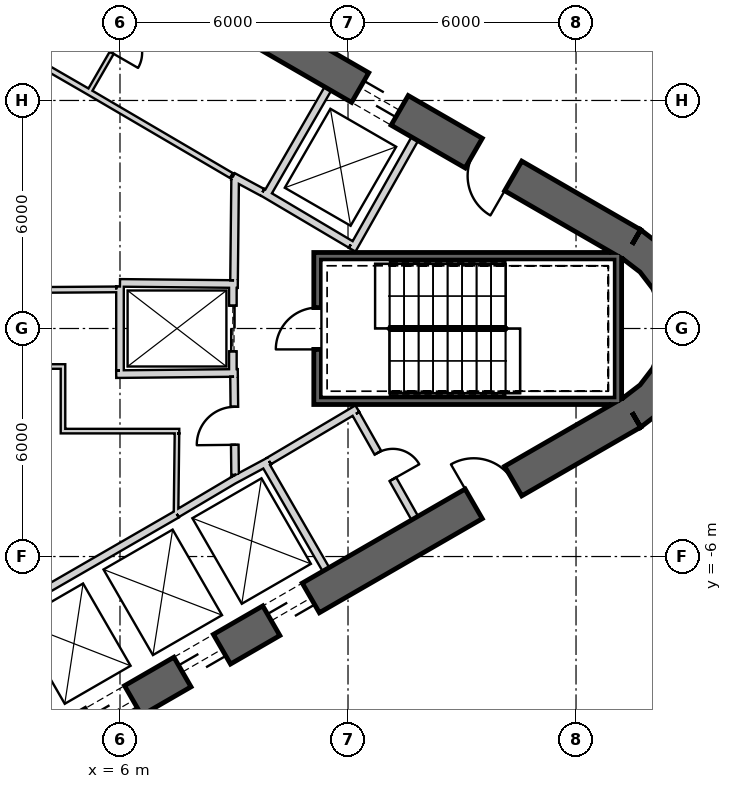
"""IFC4 building model, lengths in metres.
Left out: names, types, materials, properties, quantities, classifications, styles, units other than length and angle.
Written with IfcOpenShell. Run it as: python <this file> out.ifc"""

import sys

from ifc_helpers import new_model, si_unit, direction, frame, frame_2d, origin, place, context, subcontext, project, spatial, polyline, rectangle, outline, extrude, element, fill, save


model = new_model("IFC4")
c1 = context("Model", 3, precision=1e-05, world=origin(), true_north=direction((0.0, 1.0)))
c2 = subcontext(c1, "Body", "Model", "MODEL_VIEW")
j1 = project(units=[si_unit("LENGTHUNIT", "METRE"), si_unit("PLANEANGLEUNIT", "RADIAN")], contexts=[c1])
p1 = place(None, origin())
s1 = spatial("IfcSite", under=j1, at=p1, CompositionType="ELEMENT")
p2 = place(p1, origin())
s2 = spatial("IfcBuilding", under=s1, at=p2, CompositionType="ELEMENT")
p3 = place(p2, frame((0.0, 0.0, 277.2)))
s3 = spatial("IfcBuildingStorey", under=s2, at=p3, CompositionType="ELEMENT", Elevation=277.2)
p4 = place(p3, frame((19.475, 2.208, 0.0), z_axis=(0.0, 0.0, 1.0), x_axis=(-0.866028369851, 0.499994862586, 0.0)))
e1 = element("IfcWall", 1, at=p4, inside=s3, PredefinedType="SHEAR", context=c2, shape_type="SweptSolid", body=[
    extrude(rectangle(XDim=31.523, YDim=0.9, at=frame_2d((15.762, 0.0))), origin(), (0.0, 0.0, 1.0), 6.5),
])
p5 = place(p4, frame((7.062, 0.0, 0.0)))
e2 = element("IfcOpeningElement", 2, at=p5, cuts=e1, PredefinedType="OPENING", context=c2, shape_type="SweptSolid", body=[
    extrude(rectangle(XDim=1.2, YDim=2.4, at=frame_2d((0.6, 1.2))), frame((0.0, 0.46, 0.0), z_axis=(0.0, -1.0, 0.0), x_axis=(1.0, 0.0, 0.0)), (0.0, 0.0, 1.0), 0.92),
])
p6 = place(p4, frame((3.612, 0.0, 0.0)))
e3 = element("IfcOpeningElement", 3, at=p6, cuts=e1, PredefinedType="OPENING", context=c2, shape_type="SweptSolid", body=[
    extrude(rectangle(XDim=1.2, YDim=2.4, at=frame_2d((0.6, 1.2))), frame((0.0, 0.46, 0.0), z_axis=(0.0, -1.0, 0.0), x_axis=(1.0, 0.0, 0.0)), (0.0, 0.0, 1.0), 0.92),
])
p7 = place(p4, frame((26.712, 0.0, 0.0)))
e4 = element("IfcOpeningElement", 4, at=p7, cuts=e1, PredefinedType="OPENING", context=c2, shape_type="SweptSolid", body=[
    extrude(rectangle(XDim=1.2, YDim=2.4, at=frame_2d((0.6, 1.2))), frame((0.0, 0.46, 0.0), z_axis=(0.0, -1.0, 0.0), x_axis=(1.0, 0.0, 0.0)), (0.0, 0.0, 1.0), 0.92),
])
p8 = place(p3, frame((-7.825, -17.97, 0.0), z_axis=(0.0, 0.0, 1.0), x_axis=(0.866028369851, 0.499994862586, 0.0)))
e5 = element("IfcWall", 5, at=p8, inside=s3, PredefinedType="SHEAR", context=c2, shape_type="SweptSolid", body=[
    extrude(rectangle(XDim=31.523, YDim=0.9, at=frame_2d((15.762, 0.0))), origin(), (0.0, 0.0, 1.0), 6.5),
])
p9 = place(p8, frame((7.062, 0.0, 0.0)))
e6 = element("IfcOpeningElement", 6, at=p9, cuts=e5, PredefinedType="OPENING", context=c2, shape_type="SweptSolid", body=[
    extrude(rectangle(XDim=1.2, YDim=2.4, at=frame_2d((0.6, 1.2))), frame((0.0, 0.46, 0.0), z_axis=(0.0, -1.0, 0.0), x_axis=(1.0, 0.0, 0.0)), (0.0, 0.0, 1.0), 0.92),
])
p10 = place(p8, frame((9.762, 0.0, 0.0)))
e7 = element("IfcOpeningElement", 7, at=p10, cuts=e5, PredefinedType="OPENING", context=c2, shape_type="SweptSolid", body=[
    extrude(rectangle(XDim=1.2, YDim=2.4, at=frame_2d((0.6, 1.2))), frame((0.0, 0.46, 0.0), z_axis=(0.0, -1.0, 0.0), x_axis=(1.0, 0.0, 0.0)), (0.0, 0.0, 1.0), 0.92),
])
p11 = place(p8, frame((12.462, 0.0, 0.0)))
e8 = element("IfcOpeningElement", 8, at=p11, cuts=e5, PredefinedType="OPENING", context=c2, shape_type="SweptSolid", body=[
    extrude(rectangle(XDim=1.2, YDim=2.4, at=frame_2d((0.6, 1.2))), frame((0.0, 0.46, 0.0), z_axis=(0.0, -1.0, 0.0), x_axis=(1.0, 0.0, 0.0)), (0.0, 0.0, 1.0), 0.92),
])
p12 = place(p8, frame((15.162, 0.0, 0.0)))
e9 = element("IfcOpeningElement", 9, at=p12, cuts=e5, PredefinedType="OPENING", context=c2, shape_type="SweptSolid", body=[
    extrude(rectangle(XDim=1.2, YDim=2.4, at=frame_2d((0.6, 1.2))), frame((0.0, 0.46, 0.0), z_axis=(0.0, -1.0, 0.0), x_axis=(1.0, 0.0, 0.0)), (0.0, 0.0, 1.0), 0.92),
])
p13 = place(p8, frame((17.862, 0.0, 0.0)))
e10 = element("IfcOpeningElement", 10, at=p13, cuts=e5, PredefinedType="OPENING", context=c2, shape_type="SweptSolid", body=[
    extrude(rectangle(XDim=1.2, YDim=2.4, at=frame_2d((0.6, 1.2))), frame((0.0, 0.46, 0.0), z_axis=(0.0, -1.0, 0.0), x_axis=(1.0, 0.0, 0.0)), (0.0, 0.0, 1.0), 0.92),
])
p14 = place(p8, frame((20.562, 0.0, 0.0)))
e11 = element("IfcOpeningElement", 11, at=p14, cuts=e5, PredefinedType="OPENING", context=c2, shape_type="SweptSolid", body=[
    extrude(rectangle(XDim=1.2, YDim=2.4, at=frame_2d((0.6, 1.2))), frame((0.0, 0.46, 0.0), z_axis=(0.0, -1.0, 0.0), x_axis=(1.0, 0.0, 0.0)), (0.0, 0.0, 1.0), 0.92),
])
p15 = place(p8, frame((26.712, 0.0, 0.0)))
e12 = element("IfcOpeningElement", 12, at=p15, cuts=e5, PredefinedType="OPENING", context=c2, shape_type="SweptSolid", body=[
    extrude(rectangle(XDim=1.2, YDim=2.4, at=frame_2d((0.6, 1.2))), frame((0.0, 0.46, 0.0), z_axis=(0.0, -1.0, 0.0), x_axis=(1.0, 0.0, 0.0)), (0.0, 0.0, 1.0), 0.92),
])
p16 = place(p8, frame((3.612, 0.0, 0.0)))
e13 = element("IfcOpeningElement", 13, at=p16, cuts=e5, PredefinedType="OPENING", context=c2, shape_type="SweptSolid", body=[
    extrude(rectangle(XDim=1.2, YDim=2.4, at=frame_2d((0.6, 1.2))), frame((0.0, 0.46, 0.0), z_axis=(0.0, -1.0, 0.0), x_axis=(1.0, 0.0, 0.0)), (0.0, 0.0, 1.0), 0.92),
])
p17 = place(p3, origin())
e14 = element("IfcWall", 14, at=p17, inside=s3, PredefinedType="SHEAR", context=c2, shape_type="SweptSolid", body=[
    extrude(outline(polyline([(19.7, -2.598), (20.321, -2.121), (20.798, -1.5), (21.098, -0.777), (21.2, 0.0), (21.098, 0.777), (20.798, 1.5), (20.321, 2.121), (19.7, 2.598), (19.25, 1.819), (19.685, 1.485), (20.019, 1.05), (20.229, 0.543), (20.3, 0.0), (20.229, -0.543), (20.019, -1.05), (19.685, -1.485), (19.25, -1.819), (19.7, -2.598)])), origin(), (0.0, 0.0, 1.0), 6.5),
])
p18 = place(p3, frame((9.847, 3.495, 0.0), z_axis=(0.0, 0.0, 1.0), x_axis=(0.499984717929, 0.866034226713, 0.0)))
e15 = element("IfcWall", 15, at=p18, inside=s3, PredefinedType="PLUMBINGWALL", context=c2, shape_type="SweptSolid", body=[
    extrude(rectangle(XDim=3.25, YDim=0.2, at=frame_2d((1.625, 0.0))), origin(), (0.0, 0.0, 1.0), 6.1),
])
p19 = place(p3, frame((12.11, 2.073, 0.0), z_axis=(0.0, 0.0, 1.0), x_axis=(0.49196600604, 0.870614408852, 0.0)))
e16 = element("IfcWall", 16, at=p19, inside=s3, PredefinedType="PLUMBINGWALL", context=c2, shape_type="SweptSolid", body=[
    extrude(rectangle(XDim=3.35, YDim=0.2, at=frame_2d((1.675, 0.0))), origin(), (0.0, 0.0, 1.0), 6.1),
])
p20 = place(p3, frame((12.073, 2.211, 0.0), z_axis=(0.0, 0.0, 1.0), x_axis=(-0.860414880418, 0.509594185166, 0.0)))
e17 = element("IfcWall", 17, at=p20, inside=s3, PredefinedType="PLUMBINGWALL", context=c2, shape_type="SweptSolid", body=[
    extrude(rectangle(XDim=2.7, YDim=0.2, at=frame_2d((1.35, 0.0))), origin(), (0.0, 0.0, 1.0), 6.1),
])
p21 = place(p3, frame((0.483, -8.936, 0.0), z_axis=(0.0, 0.0, 1.0), x_axis=(0.866030989016, 0.499990325971, 0.0)))
e18 = element("IfcWall", 18, at=p21, inside=s3, PredefinedType="PLUMBINGWALL", context=c2, shape_type="SweptSolid", body=[
    extrude(rectangle(XDim=8.1, YDim=0.2, at=frame_2d((4.05, 0.0))), origin(), (0.0, 0.0, 1.0), 6.1),
])
p22 = place(p3, frame((9.795, -3.525, 0.0), z_axis=(0.0, 0.0, 1.0), x_axis=(0.499984717929, -0.866034226713, 0.0)))
e19 = element("IfcWall", 19, at=p22, inside=s3, PredefinedType="PLUMBINGWALL", context=c2, shape_type="SweptSolid", body=[
    extrude(rectangle(XDim=3.25, YDim=0.2, at=frame_2d((1.625, 0.0))), origin(), (0.0, 0.0, 1.0), 6.1),
])
p23 = place(p3, frame((8.974, -3.999, 0.0), z_axis=(0.0, 0.0, 1.0), x_axis=(0.880907015104, 0.473289373154, 0.0)))
e20 = element("IfcWall", 20, at=p23, inside=s3, PredefinedType="PLUMBINGWALL", context=c2, shape_type="SweptSolid", body=[
    extrude(rectangle(XDim=1.078, YDim=0.2, at=frame_2d((0.539, 0.0))), origin(), (0.0, 0.0, 1.0), 6.1),
])
p24 = place(p3, frame((7.493, -4.878, 0.0), z_axis=(0.0, 0.0, 1.0), x_axis=(0.859981807212, 0.510324691999, 0.0)))
e21 = element("IfcWall", 21, at=p24, inside=s3, PredefinedType="PLUMBINGWALL", context=c2, shape_type="SweptSolid", body=[
    extrude(rectangle(XDim=1.845, YDim=0.2, at=frame_2d((0.922, 0.0))), origin(), (0.0, 0.0, 1.0), 6.1),
])
p25 = place(p3, frame((19.2, 1.9, -0.35), z_axis=(0.0, 0.0, 1.0), x_axis=(-1.0, 0.0, 0.0)))
e22 = element("IfcWall", 22, at=p25, inside=s3, PredefinedType="SHEAR", context=c2, shape_type="SweptSolid", body=[
    extrude(rectangle(XDim=8.1, YDim=0.2, at=frame_2d((4.05, 0.0))), origin(), (0.0, 0.0, 1.0), 6.45),
])
p26 = place(p3, frame((19.1, -2.0, -0.35), z_axis=(0.0, 0.0, 1.0), x_axis=(0.0, 1.0, 0.0)))
e23 = element("IfcWall", 23, at=p26, inside=s3, PredefinedType="SHEAR", context=c2, shape_type="SweptSolid", body=[
    extrude(rectangle(XDim=3.8, YDim=0.2, at=frame_2d((1.9, 0.0))), origin(), (0.0, 0.0, 1.0), 6.45),
])
p27 = place(p3, frame((11.1, -1.9, -0.35), z_axis=(0.0, 0.0, 1.0), x_axis=(1.0, 0.0, 0.0)))
e24 = element("IfcWall", 24, at=p27, inside=s3, PredefinedType="SHEAR", context=c2, shape_type="SweptSolid", body=[
    extrude(rectangle(XDim=7.9, YDim=0.2, at=frame_2d((3.95, 0.0))), origin(), (0.0, 0.0, 1.0), 6.45),
])
p28 = place(p3, frame((11.2, -1.8, -0.35), z_axis=(0.0, 0.0, 1.0), x_axis=(0.0, 1.0, 0.0)))
e25 = element("IfcWall", 25, at=p28, inside=s3, PredefinedType="SHEAR", context=c2, shape_type="SweptSolid", body=[
    extrude(rectangle(XDim=3.6, YDim=0.2, at=frame_2d((1.8, 0.0))), origin(), (0.0, 0.0, 1.0), 6.45),
])
p29 = place(p28, frame((1.25, 0.0, 0.35)))
e26 = element("IfcOpeningElement", 26, at=p29, cuts=e25, PredefinedType="OPENING", context=c2, shape_type="SweptSolid", body=[
    extrude(rectangle(XDim=1.1, YDim=2.1, at=frame_2d((0.55, 1.05))), frame((0.0, 0.11, 0.0), z_axis=(0.0, -1.0, 0.0), x_axis=(1.0, 0.0, 0.0)), (0.0, 0.0, 1.0), 0.22),
])
p30 = place(p3, frame((8.97, 1.2, 0.0), z_axis=(0.0, 0.0, 1.0), x_axis=(0.0, -1.0, 0.0)))
e27 = element("IfcWall", 27, at=p30, inside=s3, PredefinedType="PLUMBINGWALL", context=c2, shape_type="SweptSolid", body=[
    extrude(rectangle(XDim=2.4, YDim=0.2, at=frame_2d((1.2, 0.0))), origin(), (0.0, 0.0, 1.0), 6.1),
])
p31 = place(p30, frame((0.6, 0.0, 0.0)))
e28 = element("IfcOpeningElement", 28, at=p31, cuts=e27, PredefinedType="OPENING", context=c2, shape_type="SweptSolid", body=[
    extrude(rectangle(XDim=1.2, YDim=2.4, at=frame_2d((0.6, 1.2))), frame((0.0, 0.11, 0.0), z_axis=(0.0, -1.0, 0.0), x_axis=(1.0, 0.0, 0.0)), (0.0, 0.0, 1.0), 0.22),
])
p32 = place(p3, frame((6.0, 1.2, 0.0), z_axis=(0.0, 0.0, 1.0), x_axis=(0.999949988, -0.010001074852, 0.0)))
e29 = element("IfcWall", 29, at=p32, inside=s3, PredefinedType="PLUMBINGWALL", context=c2, shape_type="SweptSolid", body=[
    extrude(rectangle(XDim=3.1, YDim=0.2, at=frame_2d((1.55, 0.0))), origin(), (0.0, 0.0, 1.0), 6.1),
])
p33 = place(p3, frame((5.9, -1.201, 0.0), z_axis=(0.0, 0.0, 1.0), x_axis=(0.999950064753, 0.009993397809, 0.0)))
e30 = element("IfcWall", 30, at=p33, inside=s3, PredefinedType="PLUMBINGWALL", context=c2, shape_type="SweptSolid", body=[
    extrude(rectangle(XDim=3.2, YDim=0.2, at=frame_2d((1.6, 0.0))), origin(), (0.0, 0.0, 1.0), 6.1),
])
p34 = place(p3, frame((6.0, -1.1, 0.0), z_axis=(0.0, 0.0, 1.0), x_axis=(0.0, 1.0, 0.0)))
e31 = element("IfcWall", 31, at=p34, inside=s3, PredefinedType="PLUMBINGWALL", context=c2, shape_type="SweptSolid", body=[
    extrude(rectangle(XDim=2.205, YDim=0.2, at=frame_2d((1.102, 0.0))), origin(), (0.0, 0.0, 1.0), 6.1),
])
p35 = place(p3, frame((6.795, 9.01, 0.0), z_axis=(0.0, 0.0, 1.0), x_axis=(-0.499984717929, -0.866034226713, 0.0)))
e32 = element("IfcWall", 32, at=p35, inside=s3, PredefinedType="PARTITIONING", context=c2, shape_type="SweptSolid", body=[
    extrude(rectangle(XDim=3.25, YDim=0.12, at=frame_2d((1.625, 0.0))), origin(), (0.0, 0.0, 1.0), 6.1),
])
p36 = place(p35, frame((1.225, 0.0, 0.0)))
e33 = element("IfcOpeningElement", 33, at=p36, cuts=e32, PredefinedType="OPENING", context=c2, shape_type="SweptSolid", body=[
    extrude(rectangle(XDim=0.8, YDim=2.1, at=frame_2d((0.4, 1.05))), frame((0.0, 0.07, 0.0), z_axis=(0.0, -1.0, 0.0), x_axis=(1.0, 0.0, 0.0)), (0.0, 0.0, 1.0), 0.14),
])
p37 = place(p3, frame((8.974, 3.999, 0.0), z_axis=(0.0, 0.0, 1.0), x_axis=(0.880917147855, -0.473270513147, 0.0)))
e34 = element("IfcWall", 34, at=p37, inside=s3, PredefinedType="PARTITIONING", context=c2, shape_type="SweptSolid", body=[
    extrude(rectangle(XDim=0.878, YDim=0.2, at=frame_2d((0.439, 0.0))), origin(), (0.0, 0.0, 1.0), 6.1),
])
p38 = place(p3, frame((8.931, 4.025, 0.0), z_axis=(0.0, 0.0, 1.0), x_axis=(-0.862666884027, 0.505772525157, 0.0)))
e35 = element("IfcWall", 35, at=p38, inside=s3, PredefinedType="PLUMBINGWALL", context=c2, shape_type="SweptSolid", body=[
    extrude(rectangle(XDim=4.372, YDim=0.15, at=frame_2d((2.186, 0.0))), origin(), (0.0, 0.0, 1.0), 6.1),
])
p39 = place(p3, frame((5.159, 6.236, 0.0), z_axis=(0.0, 0.0, 1.0), x_axis=(-0.866028230842, 0.499995103361, 0.0)))
e36 = element("IfcWall", 36, at=p39, inside=s3, PredefinedType="PLUMBINGWALL", context=c2, shape_type="SweptSolid", body=[
    extrude(rectangle(XDim=5.4, YDim=0.15, at=frame_2d((2.7, 0.0))), origin(), (0.0, 0.0, 1.0), 6.1),
])
p40 = place(p39, frame((2.3, 0.0, 0.0)))
e37 = element("IfcOpeningElement", 37, at=p40, cuts=e36, PredefinedType="OPENING", context=c2, shape_type="SweptSolid", body=[
    extrude(rectangle(XDim=0.8, YDim=2.1, at=frame_2d((0.4, 1.05))), frame((0.0, 0.085, 0.0), z_axis=(0.0, -1.0, 0.0), x_axis=(1.0, 0.0, 0.0)), (0.0, 0.0, 1.0), 0.17),
])
p41 = place(p3, frame((12.245, -2.109, 0.0), z_axis=(0.0, 0.0, 1.0), x_axis=(-0.860414880418, -0.509594185166, 0.0)))
e38 = element("IfcWall", 38, at=p41, inside=s3, PredefinedType="PARTITIONING", context=c2, shape_type="SweptSolid", body=[
    extrude(rectangle(XDim=2.7, YDim=0.2, at=frame_2d((1.35, 0.0))), origin(), (0.0, 0.0, 1.0), 6.1),
])
p42 = place(p3, frame((13.758, -4.99, 0.0), z_axis=(0.0, 0.0, 1.0), x_axis=(-0.491993409184, 0.87059892334, 0.0)))
e39 = element("IfcWall", 39, at=p42, inside=s3, PredefinedType="PARTITIONING", context=c2, shape_type="SweptSolid", body=[
    extrude(rectangle(XDim=3.15, YDim=0.2, at=frame_2d((1.575, 0.0))), origin(), (0.0, 0.0, 1.0), 6.1),
])
p43 = place(p42, frame((1.175, 0.0, 0.0)))
e40 = element("IfcOpeningElement", 40, at=p43, cuts=e39, PredefinedType="OPENING", context=c2, shape_type="SweptSolid", body=[
    extrude(rectangle(XDim=0.8, YDim=2.1, at=frame_2d((0.4, 1.05))), frame((0.0, 0.11, 0.0), z_axis=(0.0, -1.0, 0.0), x_axis=(1.0, 0.0, 0.0)), (0.0, 0.0, 1.0), 0.22),
])
p44 = place(p3, frame((9.001, 1.27, 0.0), z_axis=(0.0, 0.0, 1.0), x_axis=(0.01074821465, 0.999942236273, 0.0)))
e41 = element("IfcWall", 41, at=p44, inside=s3, PredefinedType="PARTITIONING", context=c2, shape_type="SweptSolid", body=[
    extrude(rectangle(XDim=2.726, YDim=0.2, at=frame_2d((1.363, 0.0))), origin(), (0.0, 0.0, 1.0), 6.1),
])
p45 = place(p3, frame((9.029, -3.851, 0.0), z_axis=(0.0, 0.0, 1.0), x_axis=(-0.010783593937, 0.99994185536, 0.0)))
e42 = element("IfcWall", 42, at=p45, inside=s3, PredefinedType="PARTITIONING", context=c2, shape_type="SweptSolid", body=[
    extrude(rectangle(XDim=2.581, YDim=0.2, at=frame_2d((1.291, 0.0))), origin(), (0.0, 0.0, 1.0), 6.1),
])
p46 = place(p45, frame((0.791, 0.0, 0.0)))
e43 = element("IfcOpeningElement", 43, at=p46, cuts=e42, PredefinedType="OPENING", context=c2, shape_type="SweptSolid", body=[
    extrude(rectangle(XDim=1.0, YDim=2.1, at=frame_2d((0.5, 1.05))), frame((0.0, 0.11, 0.0), z_axis=(0.0, -1.0, 0.0), x_axis=(1.0, 0.0, 0.0)), (0.0, 0.0, 1.0), 0.22),
])
p47 = place(p3, frame((1.518, 0.999, 0.0), z_axis=(0.0, 0.0, 1.0), x_axis=(0.999976903524, 0.006796500403, 0.0)))
e44 = element("IfcWall", 44, at=p47, inside=s3, PredefinedType="PLUMBINGWALL", context=c2, shape_type="SweptSolid", body=[
    extrude(rectangle(XDim=4.382, YDim=0.15, at=frame_2d((2.191, 0.0))), origin(), (0.0, 0.0, 1.0), 6.1),
])
p48 = place(p47, frame((1.855, 0.0, 0.0)))
e45 = element("IfcOpeningElement", 45, at=p48, cuts=e44, PredefinedType="OPENING", context=c2, shape_type="SweptSolid", body=[
    extrude(rectangle(XDim=0.8, YDim=2.1, at=frame_2d((0.4, 1.05))), frame((0.0, 0.085, 0.0), z_axis=(0.0, -1.0, 0.0), x_axis=(1.0, 0.0, 0.0)), (0.0, 0.0, 1.0), 0.17),
])
p49 = place(p3, frame((4.56, -1.0, 0.0), z_axis=(0.0, 0.0, 1.0), x_axis=(-1.0, 0.0, 0.0)))
e46 = element("IfcWall", 46, at=p49, inside=s3, PredefinedType="PARTITIONING", context=c2, shape_type="SweptSolid", body=[
    extrude(rectangle(XDim=2.896, YDim=0.12, at=frame_2d((1.448, 0.0))), origin(), (0.0, 0.0, 1.0), 6.1),
])
p50 = place(p3, frame((4.5, -2.76, 0.0), z_axis=(0.0, 0.0, 1.0), x_axis=(0.0, 1.0, 0.0)))
e47 = element("IfcWall", 47, at=p50, inside=s3, PredefinedType="PARTITIONING", context=c2, shape_type="SweptSolid", body=[
    extrude(rectangle(XDim=1.7, YDim=0.12, at=frame_2d((0.85, 0.0))), origin(), (0.0, 0.0, 1.0), 6.1),
])
p51 = place(p3, frame((7.56, -2.7, 0.0), z_axis=(0.0, 0.0, 1.0), x_axis=(-1.0, 0.0, 0.0)))
e48 = element("IfcWall", 48, at=p51, inside=s3, PredefinedType="PARTITIONING", context=c2, shape_type="SweptSolid", body=[
    extrude(rectangle(XDim=3.0, YDim=0.12, at=frame_2d((1.5, 0.0))), origin(), (0.0, 0.0, 1.0), 6.1),
])
p52 = place(p3, frame((7.475, -4.865, 0.0), z_axis=(0.0, 0.0, 1.0), x_axis=(0.011716133148, 0.999931363757, 0.0)))
e49 = element("IfcWall", 49, at=p52, inside=s3, PredefinedType="PARTITIONING", context=c2, shape_type="SweptSolid", body=[
    extrude(rectangle(XDim=2.105, YDim=0.12, at=frame_2d((1.052, 0.0))), origin(), (0.0, 0.0, 1.0), 6.1),
])
p53 = place(p3, frame((18.006, -13.968, 0.0), z_axis=(0.0, 0.0, 1.0), x_axis=(0.866026830048, 0.499997529631, 0.0)))
e50 = element("IfcWall", 50, at=p53, inside=s3, PredefinedType="PARTITIONING", context=c2, shape_type="SweptSolid", body=[
    extrude(rectangle(XDim=8.758, YDim=0.12, at=frame_2d((4.379, 0.0))), origin(), (0.0, 0.0, 1.0), 6.1),
])
p54 = place(p53, frame((1.0, 0.0, 0.0)))
e51 = element("IfcOpeningElement", 51, at=p54, cuts=e50, PredefinedType="OPENING", context=c2, shape_type="SweptSolid", body=[
    extrude(rectangle(XDim=1.0, YDim=2.1, at=frame_2d((0.5, 1.05))), frame((0.0, 0.07, 0.0), z_axis=(0.0, -1.0, 0.0), x_axis=(1.0, 0.0, 0.0)), (0.0, 0.0, 1.0), 0.14),
])
p55 = place(p29, origin())
e52 = element("IfcDoor", 52, at=p55, inside=s3, OperationType="SINGLE_SWING_LEFT", PredefinedType="USERDEFINED", context=c2, shape_type="SweptSolid", body=[
    extrude(rectangle(XDim=1.1, YDim=2.1, at=frame_2d((0.55, 1.05))), frame((0.0, 0.025, 0.0), z_axis=(0.0, -1.0, 0.0), x_axis=(1.0, 0.0, 0.0)), (0.0, 0.0, 1.0), 0.05),
])
fill(e26, e52)
p56 = place(p46, origin())
e53 = element("IfcDoor", 53, at=p56, inside=s3, OperationType="SINGLE_SWING_LEFT", PredefinedType="USERDEFINED", context=c2, shape_type="SweptSolid", body=[
    extrude(rectangle(XDim=1.0, YDim=2.1, at=frame_2d((0.5, 1.05))), frame((0.0, 0.025, 0.0), z_axis=(0.0, -1.0, 0.0), x_axis=(1.0, 0.0, 0.0)), (0.0, 0.0, 1.0), 0.05),
])
fill(e43, e53)
p57 = place(p31, origin())
e54 = element("IfcDoor", 54, at=p57, inside=s3, OperationType="SLIDING_TO_LEFT", PredefinedType="USERDEFINED", context=c2, shape_type="SweptSolid", body=[
    extrude(rectangle(XDim=1.2, YDim=2.4, at=frame_2d((0.6, 1.2))), frame((0.0, 0.025, 0.0), z_axis=(0.0, -1.0, 0.0), x_axis=(1.0, 0.0, 0.0)), (0.0, 0.0, 1.0), 0.05),
])
fill(e28, e54)
p58 = place(p36, origin())
e55 = element("IfcDoor", 55, at=p58, inside=s3, OperationType="SINGLE_SWING_RIGHT", PredefinedType="USERDEFINED", context=c2, shape_type="SweptSolid", body=[
    extrude(rectangle(XDim=0.8, YDim=2.1, at=frame_2d((0.4, 1.05))), frame((0.0, 0.025, 0.0), z_axis=(0.0, -1.0, 0.0), x_axis=(1.0, 0.0, 0.0)), (0.0, 0.0, 1.0), 0.05),
])
fill(e33, e55)
p59 = place(p43, origin())
e56 = element("IfcDoor", 56, at=p59, inside=s3, OperationType="SINGLE_SWING_LEFT", PredefinedType="USERDEFINED", context=c2, shape_type="SweptSolid", body=[
    extrude(rectangle(XDim=0.8, YDim=2.1, at=frame_2d((0.4, 1.05))), frame((0.0, 0.025, 0.0), z_axis=(0.0, -1.0, 0.0), x_axis=(1.0, 0.0, 0.0)), (0.0, 0.0, 1.0), 0.05),
])
fill(e40, e56)
p60 = place(p5, origin())
e57 = element("IfcDoor", 57, at=p60, inside=s3, OperationType="SLIDING_TO_LEFT", PredefinedType="USERDEFINED", context=c2, shape_type="SweptSolid", body=[
    extrude(rectangle(XDim=1.2, YDim=2.4, at=frame_2d((0.6, 1.2))), frame((0.0, 0.025, 0.0), z_axis=(0.0, -1.0, 0.0), x_axis=(1.0, 0.0, 0.0)), (0.0, 0.0, 1.0), 0.05),
])
fill(e2, e57)
p61 = place(p12, origin())
e58 = element("IfcDoor", 58, at=p61, inside=s3, OperationType="SLIDING_TO_LEFT", PredefinedType="USERDEFINED", context=c2, shape_type="SweptSolid", body=[
    extrude(rectangle(XDim=1.2, YDim=2.4, at=frame_2d((0.6, 1.2))), frame((0.0, 0.025, 0.0), z_axis=(0.0, -1.0, 0.0), x_axis=(1.0, 0.0, 0.0)), (0.0, 0.0, 1.0), 0.05),
])
fill(e9, e58)
p62 = place(p13, origin())
e59 = element("IfcDoor", 59, at=p62, inside=s3, OperationType="SLIDING_TO_LEFT", PredefinedType="USERDEFINED", context=c2, shape_type="SweptSolid", body=[
    extrude(rectangle(XDim=1.2, YDim=2.4, at=frame_2d((0.6, 1.2))), frame((0.0, 0.025, 0.0), z_axis=(0.0, -1.0, 0.0), x_axis=(1.0, 0.0, 0.0)), (0.0, 0.0, 1.0), 0.05),
])
fill(e10, e59)
p63 = place(p14, origin())
e60 = element("IfcDoor", 60, at=p63, inside=s3, OperationType="SLIDING_TO_LEFT", PredefinedType="USERDEFINED", context=c2, shape_type="SweptSolid", body=[
    extrude(rectangle(XDim=1.2, YDim=2.4, at=frame_2d((0.6, 1.2))), frame((0.0, 0.025, 0.0), z_axis=(0.0, -1.0, 0.0), x_axis=(1.0, 0.0, 0.0)), (0.0, 0.0, 1.0), 0.05),
])
fill(e11, e60)
p64 = place(p15, origin())
e61 = element("IfcDoor", 61, at=p64, inside=s3, OperationType="SINGLE_SWING_LEFT", PredefinedType="USERDEFINED", context=c2, shape_type="SweptSolid", body=[
    extrude(rectangle(XDim=1.2, YDim=2.4, at=frame_2d((0.6, 1.2))), frame((0.0, 0.025, 0.0), z_axis=(0.0, -1.0, 0.0), x_axis=(1.0, 0.0, 0.0)), (0.0, 0.0, 1.0), 0.05),
])
fill(e12, e61)
p65 = place(p6, origin())
e62 = element("IfcDoor", 62, at=p65, inside=s3, OperationType="SINGLE_SWING_LEFT", PredefinedType="USERDEFINED", context=c2, shape_type="SweptSolid", body=[
    extrude(rectangle(XDim=1.2, YDim=2.4, at=frame_2d((0.6, 1.2))), frame((0.0, 0.025, 0.0), z_axis=(0.0, -1.0, 0.0), x_axis=(1.0, 0.0, 0.0)), (0.0, 0.0, 1.0), 0.05),
])
fill(e3, e62)
save(model, sys.argv[1])
